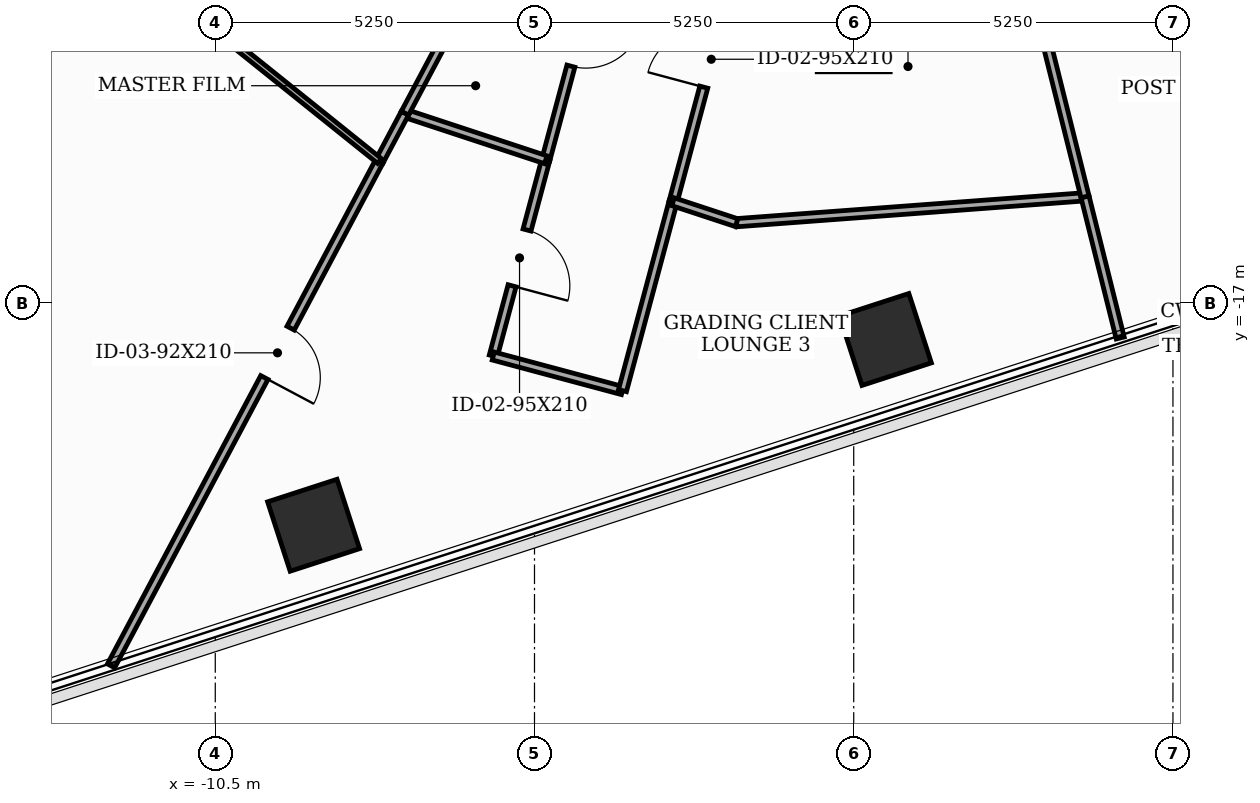
"""IFC4 building model, lengths in metres.
Left out: names, types, materials, properties, quantities, classifications, styles, units other than length and angle.
Written with IfcOpenShell. Run it as: python <this file> out.ifc"""

import sys

from ifc_helpers import new_model, si_unit, direction, frame, frame_2d, origin, origin_2d, place, context, subcontext, project, spatial, rectangle, extrude, element, fill, save


model = new_model("IFC4")
c1 = context("Model", 3, precision=1e-05, world=origin(), true_north=direction((0.0, 1.0)))
c2 = subcontext(c1, "Body", "Model", "MODEL_VIEW")
j1 = project(units=[si_unit("LENGTHUNIT", "METRE"), si_unit("PLANEANGLEUNIT", "RADIAN")], contexts=[c1])
p1 = place(None, origin())
s1 = spatial("IfcSite", under=j1, at=p1, CompositionType="ELEMENT")
p2 = place(p1, origin())
s2 = spatial("IfcBuilding", under=s1, at=p2, CompositionType="ELEMENT")
p3 = place(p2, frame((0.0, 0.0, 90.3)))
s3 = spatial("IfcBuildingStorey", under=s2, at=p3, CompositionType="ELEMENT", Elevation=90.3)
for number, where, z_axis, x_axis in (
    (1, (0.0, -12.6, 0.0), (0.0, 0.0, 1.0), (1.0, 0.0, 0.0)),
    (2, (-8.883, -20.658, 0.0), (0.0, 0.0, 1.0), (0.951, 0.309, 0.0)),
    (3, (0.521, -17.603, 0.0), (0.0, 0.0, 1.0), (0.951, 0.309, 0.0)),
):
    element("IfcColumn", number, at=place(p3, frame(where, z_axis=z_axis, x_axis=x_axis)), inside=s3, PredefinedType="COLUMN", context=c2, shape_type="SweptSolid", body=[
        extrude(rectangle(XDim=1.2, YDim=1.2, at=origin_2d()), origin(), (0.0, 0.0, 1.0), 3.7),
    ])
p4 = place(p3, frame((-3.992, -10.65, 0.0), z_axis=(0.0, 0.0, 1.0), x_axis=(-0.259046685972, -0.96586480135, 0.0)))
e4 = element("IfcWall", 4, at=p4, inside=s3, PredefinedType="PARTITIONING", context=c2, shape_type="SweptSolid", body=[
    extrude(rectangle(XDim=4.138, YDim=0.135, at=frame_2d((2.069, 0.0))), origin(), (0.0, 0.0, 1.0), 2.785),
])
p5 = place(p4, frame((1.594, 0.0, 0.0)))
e5 = element("IfcOpeningElement", 5, at=p5, cuts=e4, PredefinedType="OPENING", context=c2, shape_type="SweptSolid", body=[
    extrude(rectangle(XDim=0.95, YDim=2.1, at=frame_2d((0.475, 1.05))), frame((0.0, 0.077, 0.0), z_axis=(0.0, -1.0, 0.0), x_axis=(1.0, 0.0, 0.0)), (0.0, 0.0, 1.0), 0.155),
])
p6 = place(p3, frame((-5.064, -14.647, 0.0), z_axis=(0.0, 0.0, 1.0), x_axis=(-0.258558355083, -0.965995640268, 0.0)))
e6 = element("IfcWall", 6, at=p6, inside=s3, PredefinedType="PARTITIONING", context=c2, shape_type="SweptSolid", body=[
    extrude(rectangle(XDim=3.342, YDim=0.135, at=frame_2d((1.671, 0.0))), origin(), (0.0, 0.0, 1.0), 3.125),
])
p7 = place(p6, frame((1.196, 0.0, 0.0)))
e7 = element("IfcOpeningElement", 7, at=p7, cuts=e6, PredefinedType="OPENING", context=c2, shape_type="SweptSolid", body=[
    extrude(rectangle(XDim=0.95, YDim=2.1, at=frame_2d((0.475, 1.05))), frame((0.0, 0.077, 0.0), z_axis=(0.0, -1.0, 0.0), x_axis=(1.0, 0.0, 0.0)), (0.0, 0.0, 1.0), 0.155),
])
p8 = place(p3, frame((-5.928, -17.875, 0.0), z_axis=(0.0, 0.0, 1.0), x_axis=(0.965959937537, -0.258691706618, 0.0)))
e8 = element("IfcWall", 8, at=p8, inside=s3, PredefinedType="PARTITIONING", context=c2, shape_type="SweptSolid", body=[
    extrude(rectangle(XDim=2.2, YDim=0.135, at=frame_2d((1.1, 0.0))), origin(), (0.0, 0.0, 1.0), 3.5),
])
p9 = place(p3, frame((-3.803, -18.444, 0.0), z_axis=(0.0, 0.0, 1.0), x_axis=(0.258739880159, 0.965947034995, 0.0)))
e9 = element("IfcWall", 9, at=p9, inside=s3, PredefinedType="PARTITIONING", context=c2, shape_type="SweptSolid", body=[
    extrude(rectangle(XDim=3.216, YDim=0.135, at=frame_2d((1.608, 0.0))), origin(), (0.0, 0.0, 1.0), 3.125),
])
p10 = place(p3, frame((-2.971, -15.338, 0.0), z_axis=(0.0, 0.0, 1.0), x_axis=(0.258764582319, 0.965940417902, 0.0)))
e10 = element("IfcWall", 10, at=p10, inside=s3, PredefinedType="PARTITIONING", context=c2, shape_type="SweptSolid", body=[
    extrude(rectangle(XDim=4.853, YDim=0.135, at=frame_2d((2.427, 0.0))), origin(), (0.0, 0.0, 1.0), 2.785),
])
p11 = place(p10, frame((1.952, 0.0, 0.0)))
e11 = element("IfcOpeningElement", 11, at=p11, cuts=e10, PredefinedType="OPENING", context=c2, shape_type="SweptSolid", body=[
    extrude(rectangle(XDim=0.95, YDim=2.1, at=frame_2d((0.475, 1.05))), frame((0.0, 0.077, 0.0), z_axis=(0.0, -1.0, 0.0), x_axis=(1.0, 0.0, 0.0)), (0.0, 0.0, 1.0), 0.155),
])
p12 = place(p3, frame((-7.382, -13.883, 0.0), z_axis=(0.0, 0.0, 1.0), x_axis=(0.949758055829, -0.312985040199, 0.0)))
e12 = element("IfcWall", 12, at=p12, inside=s3, PredefinedType="PARTITIONING", context=c2, shape_type="SweptSolid", body=[
    extrude(rectangle(XDim=2.441, YDim=0.135, at=frame_2d((1.22, 0.0))), origin(), (0.0, 0.0, 1.0), 2.785),
])
p13 = place(p3, frame((-5.663, -10.65, 0.0), z_axis=(0.0, 0.0, 1.0), x_axis=(-0.469449315633, -0.882959421521, 0.0)))
e13 = element("IfcWall", 13, at=p13, inside=s3, PredefinedType="PARTITIONING", context=c2, shape_type="SweptSolid", body=[
    extrude(rectangle(XDim=3.662, YDim=0.135, at=frame_2d((1.831, 0.0))), origin(), (0.0, 0.0, 1.0), 2.785),
])
p14 = place(p3, frame((3.804, -15.256, 0.0), z_axis=(0.0, 0.0, 1.0), x_axis=(-0.99725056907, -0.07410332307, 0.0)))
e14 = element("IfcWall", 14, at=p14, inside=s3, PredefinedType="PARTITIONING", context=c2, shape_type="SweptSolid", body=[
    extrude(rectangle(XDim=5.746, YDim=0.135, at=frame_2d((2.873, 0.0))), origin(), (0.0, 0.0, 1.0), 2.785),
])
p15 = place(p3, frame((-1.926, -15.682, 0.0), z_axis=(0.0, 0.0, 1.0), x_axis=(-0.949852955326, 0.312696919171, 0.0)))
e15 = element("IfcWall", 15, at=p15, inside=s3, PredefinedType="PARTITIONING", context=c2, shape_type="SweptSolid", body=[
    extrude(rectangle(XDim=1.1, YDim=0.135, at=frame_2d((0.55, 0.0))), origin(), (0.0, 0.0, 1.0), 3.125),
])
p16 = place(p3, frame((-7.382, -13.883, 0.0), z_axis=(0.0, 0.0, 1.0), x_axis=(-0.469617532863, -0.882869963714, 0.0)))
e16 = element("IfcWall", 16, at=p16, inside=s3, PredefinedType="PARTITIONING", context=c2, shape_type="SweptSolid", body=[
    extrude(rectangle(XDim=0.888, YDim=0.135, at=frame_2d((0.444, 0.0))), origin(), (0.0, 0.0, 1.0), 2.785),
])
p17 = place(p3, frame((-7.799, -14.667, 0.0), z_axis=(0.0, 0.0, 1.0), x_axis=(-0.469441180524, -0.882963746723, 0.0)))
e17 = element("IfcWall", 17, at=p17, inside=s3, PredefinedType="PARTITIONING", context=c2, shape_type="SweptSolid", body=[
    extrude(rectangle(XDim=9.404, YDim=0.135, at=frame_2d((4.702, 0.0))), origin(), (0.0, 0.0, 1.0), 2.935),
])
p18 = place(p17, frame((3.114, 0.0, 0.0)))
e18 = element("IfcOpeningElement", 18, at=p18, cuts=e17, PredefinedType="OPENING", context=c2, shape_type="SweptSolid", body=[
    extrude(rectangle(XDim=0.92, YDim=2.1, at=frame_2d((0.46, 1.05))), frame((0.0, 0.077, 0.0), z_axis=(0.0, -1.0, 0.0), x_axis=(1.0, 0.0, 0.0)), (0.0, 0.0, 1.0), 0.155),
])
p19 = place(p3, frame((4.383, -17.578, 0.0), z_axis=(0.0, 0.0, 1.0), x_axis=(-0.241887449135, 0.970304314095, 0.0)))
e19 = element("IfcWall", 19, at=p19, inside=s3, PredefinedType="PARTITIONING", context=c2, shape_type="SweptSolid", body=[
    extrude(rectangle(XDim=2.393, YDim=0.135, at=frame_2d((1.197, 0.0))), origin(), (0.0, 0.0, 1.0), 2.935),
])
p20 = place(p3, frame((3.804, -15.256, 0.0), z_axis=(0.0, 0.0, 1.0), x_axis=(-0.24201527033, 0.970272440569, 0.0)))
e20 = element("IfcWall", 20, at=p20, inside=s3, PredefinedType="PARTITIONING", context=c2, shape_type="SweptSolid", body=[
    extrude(rectangle(XDim=4.747, YDim=0.135, at=frame_2d((2.374, 0.0))), origin(), (0.0, 0.0, 1.0), 2.785),
])
p21 = place(p3, frame((-12.978, -10.51, 0.0), z_axis=(0.0, 0.0, 1.0), x_axis=(0.779852762203, -0.625962993543, 0.0)))
e21 = element("IfcWall", 21, at=p21, inside=s3, PredefinedType="MOVABLE", context=c2, shape_type="SweptSolid", body=[
    extrude(rectangle(XDim=6.641, YDim=0.1, at=frame_2d((3.32, 0.0))), origin(), (0.0, 0.0, 1.0), 3.5),
])
p22 = place(p5, origin())
e22 = element("IfcDoor", 22, at=p22, inside=s3, OperationType="SINGLE_SWING_LEFT", PredefinedType="DOOR", context=c2, shape_type="SweptSolid", body=[
    extrude(rectangle(XDim=0.95, YDim=2.1, at=frame_2d((0.475, 1.05))), frame((0.0, 0.025, 0.0), z_axis=(0.0, -1.0, 0.0), x_axis=(1.0, 0.0, 0.0)), (0.0, 0.0, 1.0), 0.05),
])
fill(e5, e22)
p23 = place(p7, origin())
e23 = element("IfcDoor", 23, at=p23, inside=s3, OperationType="SINGLE_SWING_RIGHT", PredefinedType="DOOR", context=c2, shape_type="SweptSolid", body=[
    extrude(rectangle(XDim=0.95, YDim=2.1, at=frame_2d((0.475, 1.05))), frame((0.0, 0.025, 0.0), z_axis=(0.0, -1.0, 0.0), x_axis=(1.0, 0.0, 0.0)), (0.0, 0.0, 1.0), 0.05),
])
fill(e7, e23)
p24 = place(p11, origin())
e24 = element("IfcDoor", 24, at=p24, inside=s3, OperationType="SINGLE_SWING_LEFT", PredefinedType="DOOR", context=c2, shape_type="SweptSolid", body=[
    extrude(rectangle(XDim=0.95, YDim=2.1, at=frame_2d((0.475, 1.05))), frame((0.0, 0.025, 0.0), z_axis=(0.0, -1.0, 0.0), x_axis=(1.0, 0.0, 0.0)), (0.0, 0.0, 1.0), 0.05),
])
fill(e11, e24)
p25 = place(p18, origin())
e25 = element("IfcDoor", 25, at=p25, inside=s3, OperationType="SINGLE_SWING_RIGHT", PredefinedType="DOOR", context=c2, shape_type="SweptSolid", body=[
    extrude(rectangle(XDim=0.92, YDim=2.1, at=frame_2d((0.46, 1.05))), frame((0.0, 0.025, 0.0), z_axis=(0.0, -1.0, 0.0), x_axis=(1.0, 0.0, 0.0)), (0.0, 0.0, 1.0), 0.05),
])
fill(e18, e25)
save(model, sys.argv[1])
